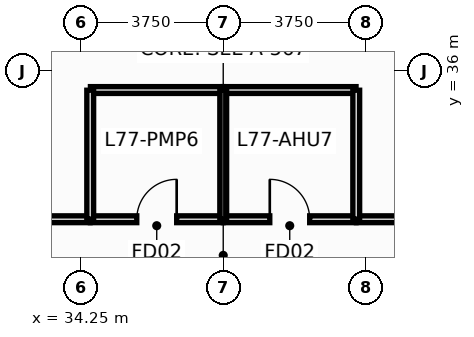
"""IFC4 building model, lengths in metres.
Left out: names, types, materials, properties, quantities, classifications, styles, units other than length and angle.
Written with IfcOpenShell. Run it as: python <this file> out.ifc"""

import sys

from ifc_helpers import new_model, si_unit, direction, frame, frame_2d, origin, place, context, subcontext, project, spatial, rectangle, extrude, element, fill, save


model = new_model("IFC4")
c1 = context("Model", 3, precision=1e-05, world=origin(), true_north=direction((0.0, 1.0)))
c2 = subcontext(c1, "Body", "Model", "MODEL_VIEW")
j1 = project(units=[si_unit("LENGTHUNIT", "METRE"), si_unit("PLANEANGLEUNIT", "RADIAN")], contexts=[c1])
p1 = place(None, origin())
s1 = spatial("IfcSite", under=j1, at=p1, CompositionType="ELEMENT")
p2 = place(p1, origin())
s2 = spatial("IfcBuilding", under=s1, at=p2, CompositionType="ELEMENT")
p3 = place(p2, frame((0.0, 0.0, 293.2)))
s3 = spatial("IfcBuildingStorey", under=s2, at=p3, CompositionType="ELEMENT", Elevation=293.2)
p4 = place(p3, frame((24.84, 32.1, 0.0), z_axis=(0.0, 0.0, 1.0), x_axis=(1.0, 0.0, 0.0)))
e1 = element("IfcWall", 1, at=p4, inside=s3, PredefinedType="PARTITIONING", context=c2, shape_type="SweptSolid", body=[
    extrude(rectangle(XDim=9.655, YDim=0.18, at=frame_2d((4.827, 0.0))), origin(), (0.0, 0.0, 1.0), 2.835),
])
p5 = place(p3, frame((41.505, 32.1, 0.0), z_axis=(0.0, 0.0, 1.0), x_axis=(1.0, 0.0, 0.0)))
e2 = element("IfcWall", 2, at=p5, inside=s3, PredefinedType="PARTITIONING", context=c2, shape_type="SweptSolid", body=[
    extrude(rectangle(XDim=8.925, YDim=0.18, at=frame_2d((4.462, 0.0))), origin(), (0.0, 0.0, 1.0), 2.835),
])
p6 = place(p3, frame((34.505, 32.1, 0.0), z_axis=(0.0, 0.0, 1.0), x_axis=(1.0, 0.0, 0.0)))
e3 = element("IfcWall", 3, at=p6, inside=s3, PredefinedType="PARTITIONING", context=c2, shape_type="SweptSolid", body=[
    extrude(rectangle(XDim=3.49, YDim=0.18, at=frame_2d((1.745, 0.0))), origin(), (0.0, 0.0, 1.0), 2.835),
])
p7 = place(p6, frame((1.22, 0.0, 0.0)))
e4 = element("IfcOpeningElement", 4, at=p7, cuts=e3, PredefinedType="OPENING", context=c2, shape_type="SweptSolid", body=[
    extrude(rectangle(XDim=1.05, YDim=2.15, at=frame_2d((0.525, 1.075))), frame((0.0, 0.102, 0.0), z_axis=(0.0, -1.0, 0.0), x_axis=(1.0, 0.0, 0.0)), (0.0, 0.0, 1.0), 0.204),
])
p8 = place(p3, frame((38.005, 32.1, 0.0), z_axis=(0.0, 0.0, 1.0), x_axis=(1.0, 0.0, 0.0)))
e5 = element("IfcWall", 5, at=p8, inside=s3, PredefinedType="PARTITIONING", context=c2, shape_type="SweptSolid", body=[
    extrude(rectangle(XDim=3.49, YDim=0.18, at=frame_2d((1.745, 0.0))), origin(), (0.0, 0.0, 1.0), 2.835),
])
p9 = place(p8, frame((1.22, 0.0, 0.0)))
e6 = element("IfcOpeningElement", 6, at=p9, cuts=e5, PredefinedType="OPENING", context=c2, shape_type="SweptSolid", body=[
    extrude(rectangle(XDim=1.05, YDim=2.15, at=frame_2d((0.525, 1.075))), frame((0.0, 0.102, 0.0), z_axis=(0.0, -1.0, 0.0), x_axis=(1.0, 0.0, 0.0)), (0.0, 0.0, 1.0), 0.204),
])
for number, where, z_axis, x_axis in (
    (7, (34.505, 35.5, 0.0), (0.0, 0.0, 1.0), (1.0, 0.0, 0.0)),
    (8, (38.005, 35.5, 0.0), (0.0, 0.0, 1.0), (1.0, 0.0, 0.0)),
):
    element("IfcWall", number, at=place(p3, frame(where, z_axis=z_axis, x_axis=x_axis)), inside=s3, PredefinedType="PARTITIONING", context=c2, shape_type="SweptSolid", body=[
        extrude(rectangle(XDim=3.49, YDim=0.18, at=frame_2d((1.745, 0.0))), origin(), (0.0, 0.0, 1.0), 3.15),
    ])
for number, where, z_axis, x_axis in (
    (9, (34.5, 32.105, 0.0), (0.0, 0.0, 1.0), (0.0, 1.0, 0.0)),
    (10, (38.0, 32.105, 0.0), (0.0, 0.0, 1.0), (0.0, 1.0, 0.0)),
    (11, (41.5, 35.495, 0.0), (0.0, 0.0, 1.0), (0.0, -1.0, 0.0)),
):
    element("IfcWall", number, at=place(p3, frame(where, z_axis=z_axis, x_axis=x_axis)), inside=s3, PredefinedType="PARTITIONING", context=c2, shape_type="SweptSolid", body=[
        extrude(rectangle(XDim=3.39, YDim=0.18, at=frame_2d((1.695, 0.0))), origin(), (0.0, 0.0, 1.0), 3.15),
    ])
p10 = place(p7, origin())
e12 = element("IfcDoor", 12, at=p10, inside=s3, OperationType="SINGLE_SWING_RIGHT", PredefinedType="DOOR", context=c2, shape_type="SweptSolid", body=[
    extrude(rectangle(XDim=1.05, YDim=2.15, at=frame_2d((0.525, 1.075))), frame((0.0, 0.025, 0.0), z_axis=(0.0, -1.0, 0.0), x_axis=(1.0, 0.0, 0.0)), (0.0, 0.0, 1.0), 0.05),
])
fill(e4, e12)
p11 = place(p9, origin())
e13 = element("IfcDoor", 13, at=p11, inside=s3, OperationType="SINGLE_SWING_LEFT", PredefinedType="DOOR", context=c2, shape_type="SweptSolid", body=[
    extrude(rectangle(XDim=1.05, YDim=2.15, at=frame_2d((0.525, 1.075))), frame((0.0, 0.025, 0.0), z_axis=(0.0, -1.0, 0.0), x_axis=(1.0, 0.0, 0.0)), (0.0, 0.0, 1.0), 0.05),
])
fill(e6, e13)
save(model, sys.argv[1])
